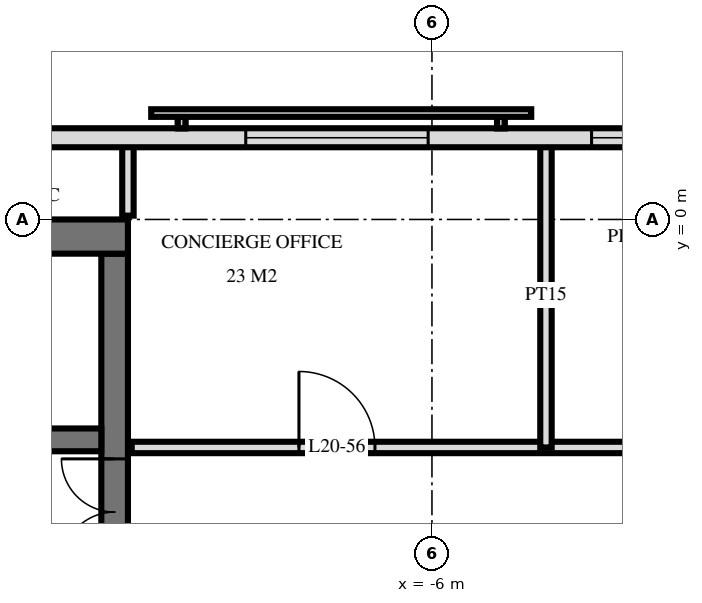
"""IFC4 building model, lengths in metres.
Left out: names, types, materials, properties, quantities, classifications, styles, units other than length and angle.
Written with IfcOpenShell. Run it as: python <this file> out.ifc"""

import sys

from ifc_helpers import new_model, si_unit, direction, frame, frame_2d, origin, place, context, subcontext, project, spatial, rectangle, extrude, element, fill, save


model = new_model("IFC4")
c1 = context("Model", 3, precision=1e-05, world=origin(), true_north=direction((0.0, 1.0)))
c2 = subcontext(c1, "Body", "Model", "MODEL_VIEW")
j1 = project(units=[si_unit("LENGTHUNIT", "METRE"), si_unit("PLANEANGLEUNIT", "RADIAN")], contexts=[c1])
p1 = place(None, origin())
s1 = spatial("IfcSite", under=j1, at=p1, CompositionType="ELEMENT")
p2 = place(p1, origin())
s2 = spatial("IfcBuilding", under=s1, at=p2, CompositionType="ELEMENT")
p3 = place(p2, frame((0.0, 0.0, 81.6)))
s3 = spatial("IfcBuildingStorey", under=s2, at=p3, CompositionType="ELEMENT", Elevation=81.6)
p4 = place(p3, frame((-29.5, -0.225, 0.0), z_axis=(0.0, 0.0, 1.0), x_axis=(1.0, 0.0, 0.0)))
e1 = element("IfcWall", 1, at=p4, inside=s3, PredefinedType="SHEAR", context=c2, shape_type="SweptSolid", body=[
    extrude(rectangle(XDim=19.5, YDim=0.45, at=frame_2d((9.75, 0.0))), origin(), (0.0, 0.0, 1.0), 3.6),
])
p5 = place(p3, frame((-10.175, -14.55, 0.0), z_axis=(0.0, 0.0, 1.0), x_axis=(0.0, 1.0, 0.0)))
e2 = element("IfcWall", 2, at=p5, inside=s3, PredefinedType="SHEAR", context=c2, shape_type="SweptSolid", body=[
    extrude(rectangle(XDim=14.1, YDim=0.35, at=frame_2d((7.05, 0.0))), origin(), (0.0, 0.0, 1.0), 3.6),
])
p6 = place(p5, frame((8.4, 0.0, 0.0)))
e3 = element("IfcOpeningElement", 3, at=p6, cuts=e2, PredefinedType="OPENING", context=c2, shape_type="SweptSolid", body=[
    extrude(rectangle(XDim=1.4, YDim=2.4, at=frame_2d((0.7, 1.2))), frame((0.0, 0.185, 0.0), z_axis=(0.0, -1.0, 0.0), x_axis=(1.0, 0.0, 0.0)), (0.0, 0.0, 1.0), 0.37),
])
p7 = place(p5, frame((10.0, 0.0, 0.0)))
e4 = element("IfcOpeningElement", 4, at=p7, cuts=e2, PredefinedType="OPENING", context=c2, shape_type="SweptSolid", body=[
    extrude(rectangle(XDim=1.4, YDim=2.4, at=frame_2d((0.7, 1.2))), frame((0.0, 0.185, 0.0), z_axis=(0.0, -1.0, 0.0), x_axis=(1.0, 0.0, 0.0)), (0.0, 0.0, 1.0), 0.37),
])
p8 = place(p5, frame((4.0, 0.0, 0.0)))
e5 = element("IfcOpeningElement", 5, at=p8, cuts=e2, PredefinedType="OPENING", context=c2, shape_type="SweptSolid", body=[
    extrude(rectangle(XDim=1.2, YDim=2.1, at=frame_2d((0.6, 1.05))), frame((0.0, 0.185, 0.0), z_axis=(0.0, -1.0, 0.0), x_axis=(1.0, 0.0, 0.0)), (0.0, 0.0, 1.0), 0.37),
])
p9 = place(p3, frame((-29.05, -2.9, 0.0), z_axis=(0.0, 0.0, 1.0), x_axis=(1.0, 0.0, 0.0)))
e6 = element("IfcWall", 6, at=p9, inside=s3, PredefinedType="SHEAR", context=c2, shape_type="SweptSolid", body=[
    extrude(rectangle(XDim=18.7, YDim=0.3, at=frame_2d((9.35, 0.0))), origin(), (0.0, 0.0, 1.0), 3.6),
])
p10 = place(p9, frame((2.95, 0.0, 0.0)))
e7 = element("IfcOpeningElement", 7, at=p10, cuts=e6, PredefinedType="OPENING", context=c2, shape_type="SweptSolid", body=[
    extrude(rectangle(XDim=1.1, YDim=2.1, at=frame_2d((0.55, 1.05))), frame((0.0, 0.16, 0.0), z_axis=(0.0, -1.0, 0.0), x_axis=(1.0, 0.0, 0.0)), (0.0, 0.0, 1.0), 0.32),
])
p11 = place(p9, frame((0.55, 0.0, 0.0)))
e8 = element("IfcOpeningElement", 8, at=p11, cuts=e6, PredefinedType="OPENING", context=c2, shape_type="SweptSolid", body=[
    extrude(rectangle(XDim=1.1, YDim=2.1, at=frame_2d((0.55, 1.05))), frame((0.0, 0.16, 0.0), z_axis=(0.0, -1.0, 0.0), x_axis=(1.0, 0.0, 0.0)), (0.0, 0.0, 1.0), 0.32),
])
p12 = place(p9, frame((11.863, 0.0, 0.0)))
e9 = element("IfcOpeningElement", 9, at=p12, cuts=e6, PredefinedType="OPENING", context=c2, shape_type="SweptSolid", body=[
    extrude(rectangle(XDim=0.9, YDim=2.1, at=frame_2d((0.45, 1.05))), frame((0.0, 0.16, 0.0), z_axis=(0.0, -1.0, 0.0), x_axis=(1.0, 0.0, 0.0)), (0.0, 0.0, 1.0), 0.32),
])
p13 = place(p9, frame((10.438, 0.0, 0.0)))
e10 = element("IfcOpeningElement", 10, at=p13, cuts=e6, PredefinedType="OPENING", context=c2, shape_type="SweptSolid", body=[
    extrude(rectangle(XDim=0.9, YDim=2.1, at=frame_2d((0.45, 1.05))), frame((0.0, 0.16, 0.0), z_axis=(0.0, -1.0, 0.0), x_axis=(1.0, 0.0, 0.0)), (0.0, 0.0, 1.0), 0.32),
])
p14 = place(p9, frame((16.85, 0.0, 0.0)))
e11 = element("IfcOpeningElement", 11, at=p14, cuts=e6, PredefinedType="OPENING", context=c2, shape_type="SweptSolid", body=[
    extrude(rectangle(XDim=1.0, YDim=2.1, at=frame_2d((0.5, 1.05))), frame((0.0, 0.16, 0.0), z_axis=(0.0, -1.0, 0.0), x_axis=(1.0, 0.0, 0.0)), (0.0, 0.0, 1.0), 0.32),
])
p15 = place(p9, frame((14.562, 0.0, 0.0)))
e12 = element("IfcOpeningElement", 12, at=p15, cuts=e6, PredefinedType="OPENING", context=c2, shape_type="SweptSolid", body=[
    extrude(rectangle(XDim=1.0, YDim=2.1, at=frame_2d((0.5, 1.05))), frame((0.0, 0.16, 0.0), z_axis=(0.0, -1.0, 0.0), x_axis=(1.0, 0.0, 0.0)), (0.0, 0.0, 1.0), 0.32),
])
p16 = place(p9, frame((13.137, 0.0, 0.0)))
e13 = element("IfcOpeningElement", 13, at=p16, cuts=e6, PredefinedType="OPENING", context=c2, shape_type="SweptSolid", body=[
    extrude(rectangle(XDim=1.0, YDim=2.1, at=frame_2d((0.5, 1.05))), frame((0.0, 0.16, 0.0), z_axis=(0.0, -1.0, 0.0), x_axis=(1.0, 0.0, 0.0)), (0.0, 0.0, 1.0), 0.32),
])
p17 = place(p9, frame((5.6, 0.0, 0.0)))
e14 = element("IfcOpeningElement", 14, at=p17, cuts=e6, PredefinedType="OPENING", context=c2, shape_type="SweptSolid", body=[
    extrude(rectangle(XDim=1.0, YDim=2.1, at=frame_2d((0.5, 1.05))), frame((0.0, 0.16, 0.0), z_axis=(0.0, -1.0, 0.0), x_axis=(1.0, 0.0, 0.0)), (0.0, 0.0, 1.0), 0.32),
])
p18 = place(p3, frame((28.775, 1.075, 0.0), z_axis=(0.0, 0.0, 1.0), x_axis=(-1.0, 0.0, 0.0)))
e15 = element("IfcWall", 15, at=p18, inside=s3, PredefinedType="SOLIDWALL", context=c2, shape_type="SweptSolid", body=[
    extrude(rectangle(XDim=57.551, YDim=0.25, at=frame_2d((28.775, 0.0))), origin(), (0.0, 0.0, 1.0), 3.32),
])
p19 = place(p18, frame((25.325, 0.0, 0.3)))
e16 = element("IfcOpeningElement", 16, at=p19, cuts=e15, PredefinedType="OPENING", context=c2, shape_type="SweptSolid", body=[
    extrude(rectangle(XDim=2.4, YDim=2.1, at=frame_2d((1.2, 1.05))), frame((0.0, 0.135, 0.0), z_axis=(0.0, -1.0, 0.0), x_axis=(1.0, 0.0, 0.0)), (0.0, 0.0, 1.0), 0.27),
])
p20 = place(p18, frame((30.275, 0.0, 0.3)))
e17 = element("IfcOpeningElement", 17, at=p20, cuts=e15, PredefinedType="OPENING", context=c2, shape_type="SweptSolid", body=[
    extrude(rectangle(XDim=2.4, YDim=2.1, at=frame_2d((1.2, 1.05))), frame((0.0, 0.135, 0.0), z_axis=(0.0, -1.0, 0.0), x_axis=(1.0, 0.0, 0.0)), (0.0, 0.0, 1.0), 0.27),
])
p21 = place(p18, frame((34.825, 0.0, 0.3)))
e18 = element("IfcOpeningElement", 18, at=p21, cuts=e15, PredefinedType="OPENING", context=c2, shape_type="SweptSolid", body=[
    extrude(rectangle(XDim=2.4, YDim=2.1, at=frame_2d((1.2, 1.05))), frame((0.0, 0.135, 0.0), z_axis=(0.0, -1.0, 0.0), x_axis=(1.0, 0.0, 0.0)), (0.0, 0.0, 1.0), 0.27),
])
p22 = place(p3, frame((-4.5, -3.0, 0.0), z_axis=(0.0, 0.0, 1.0), x_axis=(0.0, 1.0, 0.0)))
e19 = element("IfcWall", 19, at=p22, inside=s3, PredefinedType="PARTITIONING", context=c2, shape_type="SweptSolid", body=[
    extrude(rectangle(XDim=4.02, YDim=0.15, at=frame_2d((2.01, 0.0))), origin(), (0.0, 0.0, 1.0), 3.32),
])
p23 = place(p3, frame((-10.0, 0.05, 0.0), z_axis=(0.0, 0.0, 1.0), x_axis=(0.0, 1.0, 0.0)))
e20 = element("IfcWall", 20, at=p23, inside=s3, PredefinedType="PARTITIONING", context=c2, shape_type="SweptSolid", body=[
    extrude(rectangle(XDim=0.97, YDim=0.15, at=frame_2d((0.485, 0.0))), origin(), (0.0, 0.0, 1.0), 3.32),
])
p24 = place(p3, frame((-9.95, -3.0, 0.0), z_axis=(0.0, 0.0, 1.0), x_axis=(1.0, 0.0, 0.0)))
e21 = element("IfcWall", 21, at=p24, inside=s3, PredefinedType="PARTITIONING", context=c2, shape_type="SweptSolid", body=[
    extrude(rectangle(XDim=19.9, YDim=0.15, at=frame_2d((9.95, 0.0))), origin(), (0.0, 0.0, 1.0), 3.32),
])
p25 = place(p24, frame((2.2, 0.0, 0.0)))
e22 = element("IfcOpeningElement", 22, at=p25, cuts=e21, PredefinedType="OPENING", context=c2, shape_type="SweptSolid", body=[
    extrude(rectangle(XDim=1.0, YDim=2.1, at=frame_2d((0.5, 1.05))), frame((0.0, 0.085, 0.0), z_axis=(0.0, -1.0, 0.0), x_axis=(1.0, 0.0, 0.0)), (0.0, 0.0, 1.0), 0.17),
])
p26 = place(p24, frame((7.2, 0.0, 0.0)))
e23 = element("IfcOpeningElement", 23, at=p26, cuts=e21, PredefinedType="OPENING", context=c2, shape_type="SweptSolid", body=[
    extrude(rectangle(XDim=1.0, YDim=2.1, at=frame_2d((0.5, 1.05))), frame((0.0, 0.085, 0.0), z_axis=(0.0, -1.0, 0.0), x_axis=(1.0, 0.0, 0.0)), (0.0, 0.0, 1.0), 0.17),
])
p27 = place(p24, frame((11.7, 0.0, 0.0)))
e24 = element("IfcOpeningElement", 24, at=p27, cuts=e21, PredefinedType="OPENING", context=c2, shape_type="SweptSolid", body=[
    extrude(rectangle(XDim=1.0, YDim=2.1, at=frame_2d((0.5, 1.05))), frame((0.0, 0.085, 0.0), z_axis=(0.0, -1.0, 0.0), x_axis=(1.0, 0.0, 0.0)), (0.0, 0.0, 1.0), 0.17),
])
p28 = place(p24, frame((15.45, 0.0, 0.0)))
e25 = element("IfcOpeningElement", 25, at=p28, cuts=e21, PredefinedType="OPENING", context=c2, shape_type="SweptSolid", body=[
    extrude(rectangle(XDim=1.0, YDim=2.1, at=frame_2d((0.5, 1.05))), frame((0.0, 0.085, 0.0), z_axis=(0.0, -1.0, 0.0), x_axis=(1.0, 0.0, 0.0)), (0.0, 0.0, 1.0), 0.17),
])
p29 = place(p24, frame((18.2, 0.0, 0.0)))
e26 = element("IfcOpeningElement", 26, at=p29, cuts=e21, PredefinedType="OPENING", context=c2, shape_type="SweptSolid", body=[
    extrude(rectangle(XDim=1.0, YDim=2.1, at=frame_2d((0.5, 1.05))), frame((0.0, 0.085, 0.0), z_axis=(0.0, -1.0, 0.0), x_axis=(1.0, 0.0, 0.0)), (0.0, 0.0, 1.0), 0.17),
])
p30 = place(p20, origin())
e27 = element("IfcWindow", 27, at=p30, inside=s3, PartitioningType="SINGLE_PANEL", PredefinedType="WINDOW", context=c2, shape_type="SweptSolid", body=[
    extrude(rectangle(XDim=2.4, YDim=2.1, at=frame_2d((1.2, 1.05))), frame((0.0, 0.03, 0.0), z_axis=(0.0, -1.0, 0.0), x_axis=(1.0, 0.0, 0.0)), (0.0, 0.0, 1.0), 0.06),
])
fill(e17, e27)
p31 = place(p21, origin())
e28 = element("IfcWindow", 28, at=p31, inside=s3, PartitioningType="SINGLE_PANEL", PredefinedType="WINDOW", context=c2, shape_type="SweptSolid", body=[
    extrude(rectangle(XDim=2.4, YDim=2.1, at=frame_2d((1.2, 1.05))), frame((0.0, 0.03, 0.0), z_axis=(0.0, -1.0, 0.0), x_axis=(1.0, 0.0, 0.0)), (0.0, 0.0, 1.0), 0.06),
])
fill(e18, e28)
p32 = place(p7, origin())
e29 = element("IfcDoor", 29, at=p32, inside=s3, OperationType="DOUBLE_DOOR_SINGLE_SWING", PredefinedType="DOOR", context=c2, shape_type="SweptSolid", body=[
    extrude(rectangle(XDim=1.4, YDim=2.4, at=frame_2d((0.7, 1.2))), frame((0.0, 0.025, 0.0), z_axis=(0.0, -1.0, 0.0), x_axis=(1.0, 0.0, 0.0)), (0.0, 0.0, 1.0), 0.05),
])
fill(e4, e29)
p33 = place(p25, origin())
e30 = element("IfcDoor", 30, at=p33, inside=s3, OperationType="SINGLE_SWING_RIGHT", PredefinedType="DOOR", context=c2, shape_type="SweptSolid", body=[
    extrude(rectangle(XDim=1.0, YDim=2.1, at=frame_2d((0.5, 1.05))), frame((0.0, 0.025, 0.0), z_axis=(0.0, -1.0, 0.0), x_axis=(1.0, 0.0, 0.0)), (0.0, 0.0, 1.0), 0.05),
])
fill(e22, e30)
save(model, sys.argv[1])
